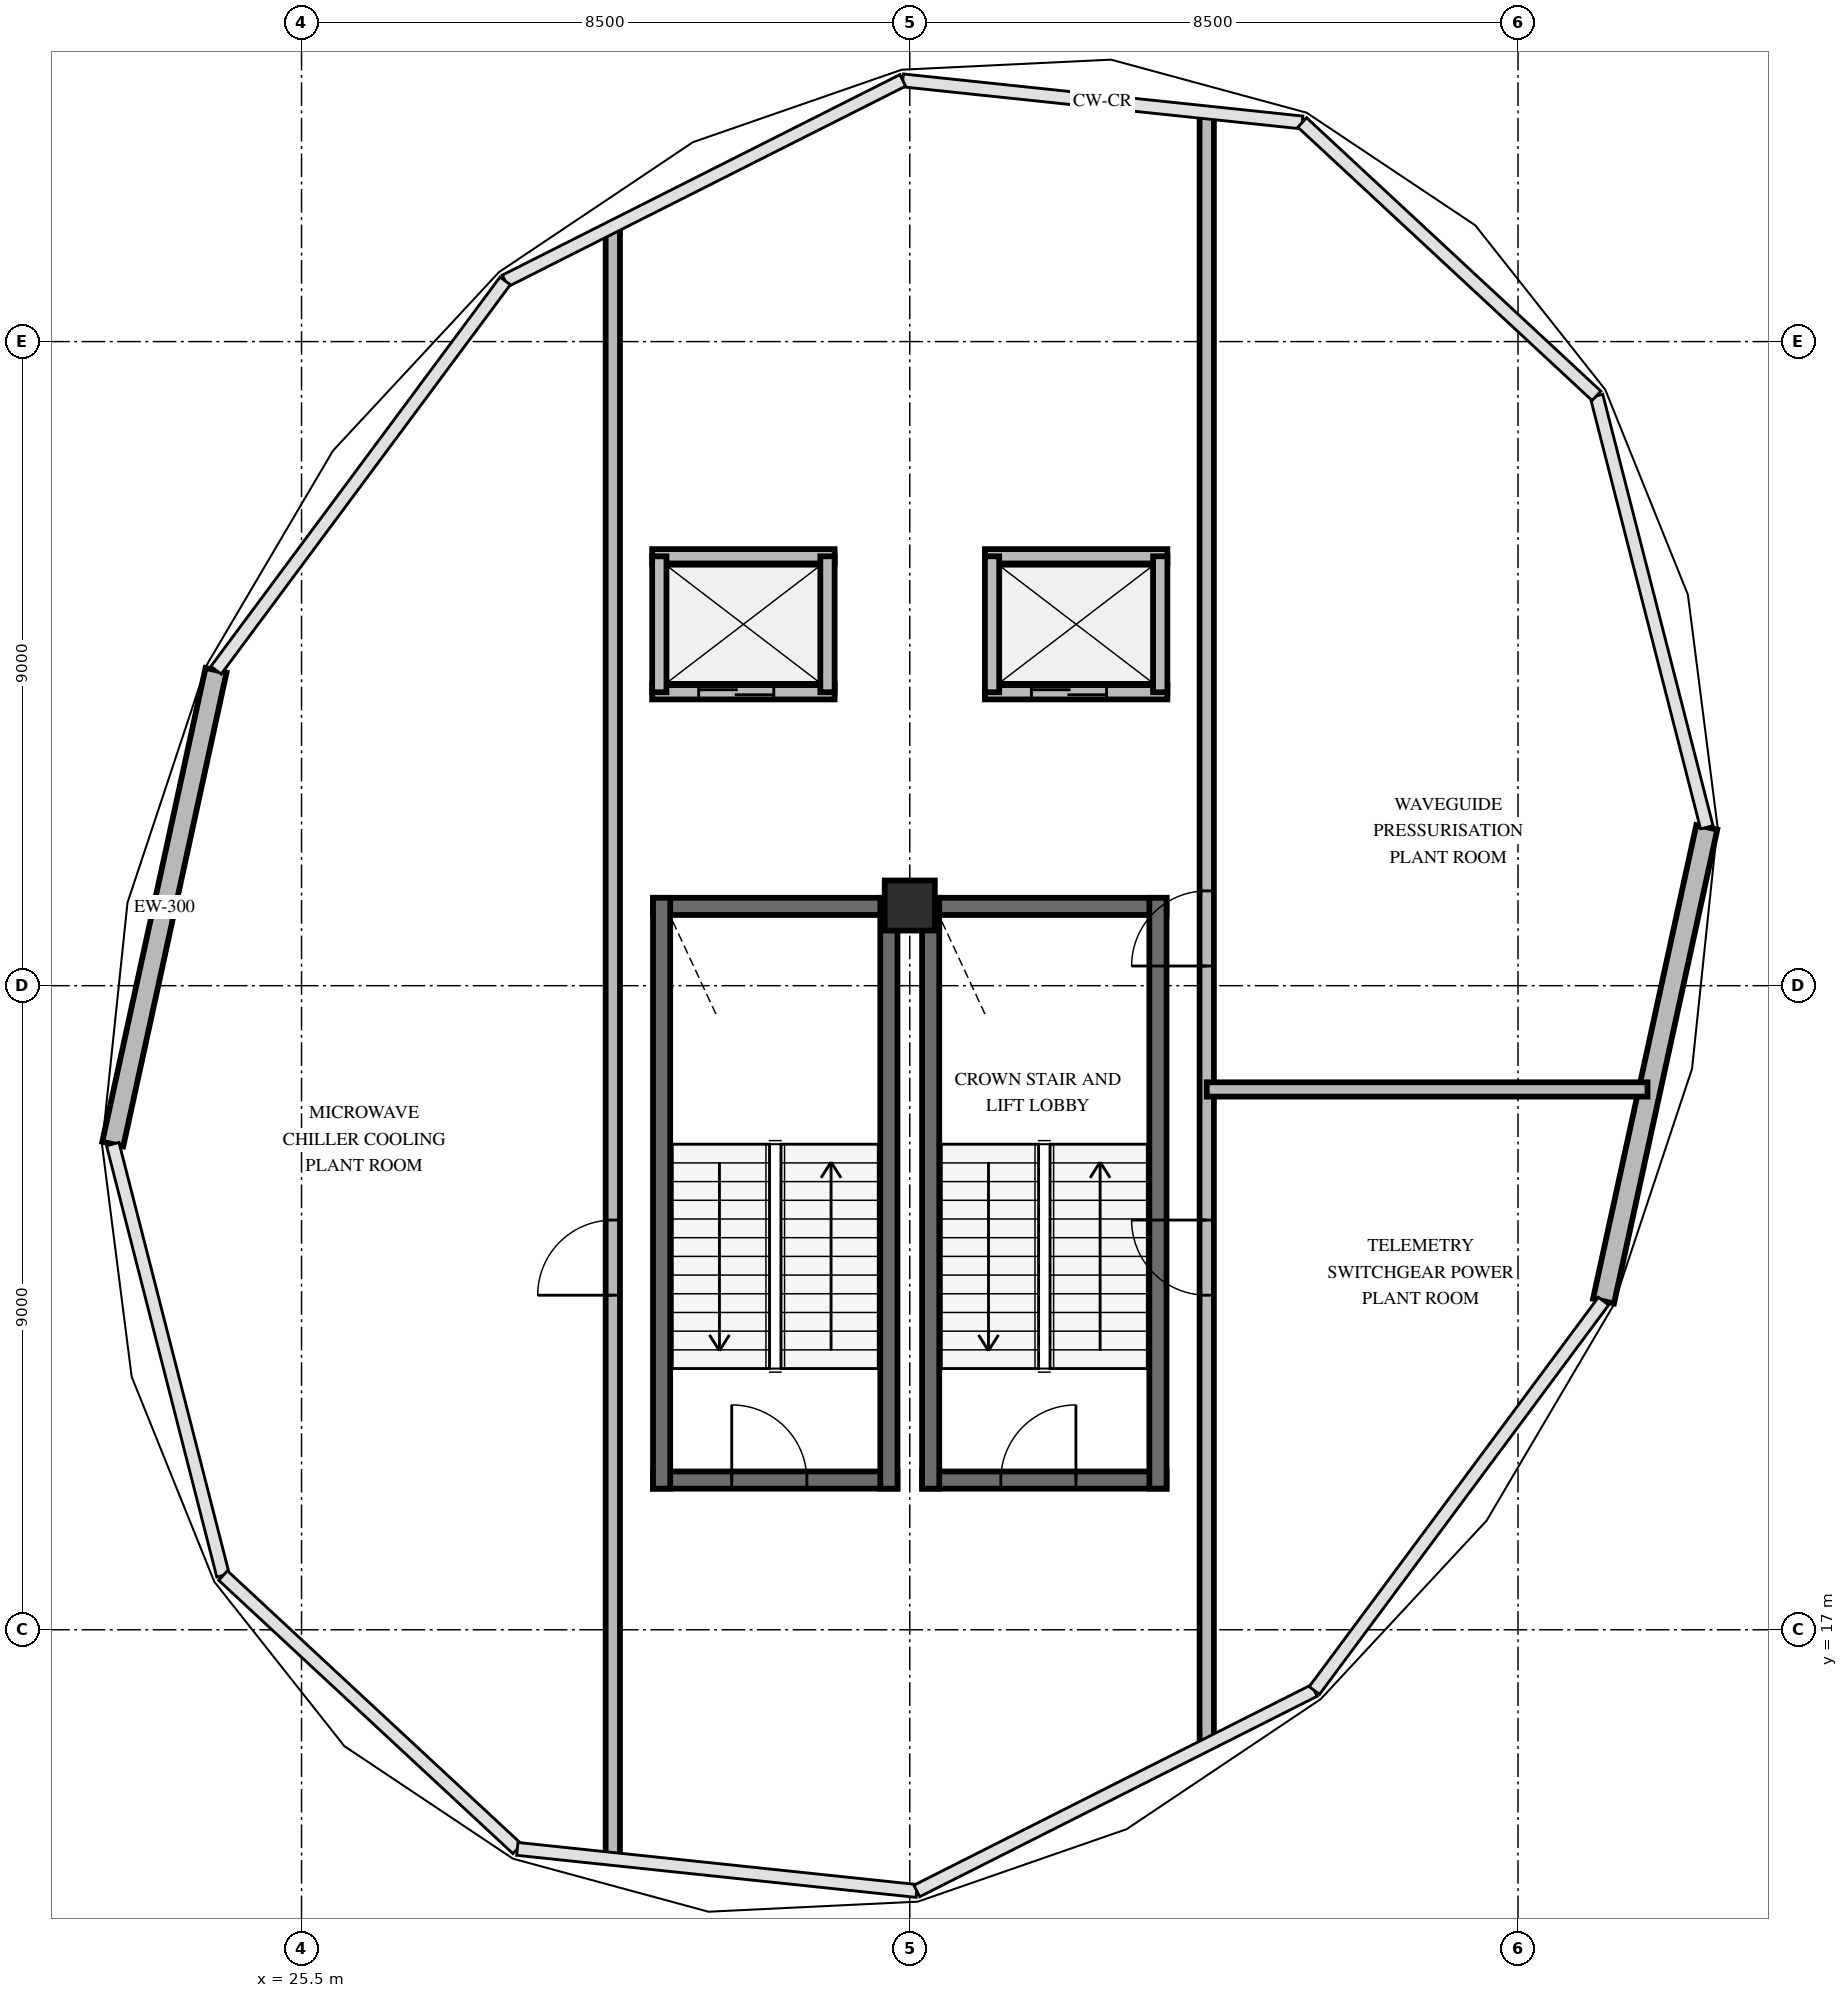
"""IFC4 building model, lengths in metres.
Left out: names, types, materials, properties, quantities, classifications, styles, units other than length and angle.
Written with IfcOpenShell. Run it as: python <this file> out.ifc"""

import sys

from ifc_helpers import new_model, si_unit, direction, frame, frame_2d, origin, origin_2d, place, context, subcontext, project, spatial, rectangle, extrude, element, fill, save


model = new_model("IFC4")
c1 = context("Model", 3, precision=1e-05, world=origin(), true_north=direction((0.0, 1.0)))
c2 = subcontext(c1, "Body", "Model", "MODEL_VIEW")
j1 = project(units=[si_unit("LENGTHUNIT", "METRE"), si_unit("PLANEANGLEUNIT", "RADIAN")], contexts=[c1])
p1 = place(None, origin())
s1 = spatial("IfcSite", under=j1, at=p1, CompositionType="ELEMENT")
p2 = place(p1, origin())
s2 = spatial("IfcBuilding", under=s1, at=p2, CompositionType="ELEMENT")
p3 = place(p2, frame((0.0, 0.0, 300.0)))
s3 = spatial("IfcBuildingStorey", under=s2, at=p3, CompositionType="ELEMENT", Elevation=300.0)
p4 = place(p3, frame((30.412, 19.092, 0.0), z_axis=(0.0, 0.0, 1.0), x_axis=(1.0, 0.0, 0.0)))
e1 = element("IfcWall", 1, at=p4, inside=s3, PredefinedType="SHEAR", context=c2, shape_type="SweptSolid", body=[
    extrude(rectangle(XDim=3.416, YDim=0.24, at=frame_2d((1.708, 0.0))), origin(), (0.0, 0.0, 1.0), 4.0),
])
p5 = place(p4, frame((1.1, 0.0, 0.0)))
e2 = element("IfcOpeningElement", 2, at=p5, cuts=e1, PredefinedType="OPENING", context=c2, shape_type="SweptSolid", body=[
    extrude(rectangle(XDim=1.05, YDim=2.15, at=frame_2d((0.525, 1.075))), frame((0.0, 0.13, 0.0), z_axis=(0.0, -1.0, 0.0), x_axis=(1.0, 0.0, 0.0)), (0.0, 0.0, 1.0), 0.26),
])
p6 = place(p3, frame((30.412, 27.108, 0.0), z_axis=(0.0, 0.0, 1.0), x_axis=(1.0, 0.0, 0.0)))
e3 = element("IfcWall", 3, at=p6, inside=s3, PredefinedType="SHEAR", context=c2, shape_type="SweptSolid", body=[
    extrude(rectangle(XDim=3.416, YDim=0.24, at=frame_2d((1.708, 0.0))), origin(), (0.0, 0.0, 1.0), 4.0),
])
for number, where, z_axis, x_axis in (
    (4, (30.532, 18.972, 0.0), (0.0, 0.0, 1.0), (0.0, 1.0, 0.0)),
    (5, (33.708, 18.972, 0.0), (0.0, 0.0, 1.0), (0.0, 1.0, 0.0)),
):
    element("IfcWall", number, at=place(p3, frame(where, z_axis=z_axis, x_axis=x_axis)), inside=s3, PredefinedType="SHEAR", context=c2, shape_type="SweptSolid", body=[
        extrude(rectangle(XDim=8.256, YDim=0.24, at=frame_2d((4.128, 0.0))), origin(), (0.0, 0.0, 1.0), 4.0),
    ])
p7 = place(p3, frame((34.172, 19.092, 0.0), z_axis=(0.0, 0.0, 1.0), x_axis=(1.0, 0.0, 0.0)))
e6 = element("IfcWall", 6, at=p7, inside=s3, PredefinedType="SHEAR", context=c2, shape_type="SweptSolid", body=[
    extrude(rectangle(XDim=3.416, YDim=0.24, at=frame_2d((1.708, 0.0))), origin(), (0.0, 0.0, 1.0), 4.0),
])
p8 = place(p7, frame((1.1, 0.0, 0.0)))
e7 = element("IfcOpeningElement", 7, at=p8, cuts=e6, PredefinedType="OPENING", context=c2, shape_type="SweptSolid", body=[
    extrude(rectangle(XDim=1.05, YDim=2.15, at=frame_2d((0.525, 1.075))), frame((0.0, 0.13, 0.0), z_axis=(0.0, -1.0, 0.0), x_axis=(1.0, 0.0, 0.0)), (0.0, 0.0, 1.0), 0.26),
])
p9 = place(p3, frame((34.172, 27.108, 0.0), z_axis=(0.0, 0.0, 1.0), x_axis=(1.0, 0.0, 0.0)))
e8 = element("IfcWall", 8, at=p9, inside=s3, PredefinedType="SHEAR", context=c2, shape_type="SweptSolid", body=[
    extrude(rectangle(XDim=3.416, YDim=0.24, at=frame_2d((1.708, 0.0))), origin(), (0.0, 0.0, 1.0), 4.0),
])
for number, where, z_axis, x_axis in (
    (9, (34.292, 18.972, 0.0), (0.0, 0.0, 1.0), (0.0, 1.0, 0.0)),
    (10, (37.468, 18.972, 0.0), (0.0, 0.0, 1.0), (0.0, 1.0, 0.0)),
):
    element("IfcWall", number, at=place(p3, frame(where, z_axis=z_axis, x_axis=x_axis)), inside=s3, PredefinedType="SHEAR", context=c2, shape_type="SweptSolid", body=[
        extrude(rectangle(XDim=8.256, YDim=0.24, at=frame_2d((4.128, 0.0))), origin(), (0.0, 0.0, 1.0), 4.0),
    ])
p10 = place(p3, frame((34.0, 27.12, 0.0), z_axis=(0.0, 0.0, 1.0), x_axis=(1.0, 0.0, 0.0)))
e11 = element("IfcColumn", 11, at=p10, inside=s3, PredefinedType="COLUMN", context=c2, shape_type="SweptSolid", body=[
    extrude(rectangle(XDim=0.7, YDim=0.7, at=origin_2d()), origin(), (0.0, 0.0, 1.0), 4.0),
])
for number, where, z_axis, x_axis in (
    (12, (24.305, 30.408, 0.0), (0.0, 0.0, 1.0), (-0.213, -0.977, 0.0)),
    (13, (43.695, 21.592, 0.0), (0.0, 0.0, 1.0), (0.213, 0.977, 0.0)),
):
    element("IfcWall", number, at=place(p3, frame(where, z_axis=z_axis, x_axis=x_axis)), inside=s3, PredefinedType="SOLIDWALL", context=c2, shape_type="SweptSolid", body=[
        extrude(rectangle(XDim=6.777, YDim=0.3, at=frame_2d((3.388, 0.0))), origin(), (0.0, 0.0, 1.0), 3.39),
    ])
p11 = place(p3, frame((30.4, 30.1, 0.0), z_axis=(0.0, 0.0, 1.0), x_axis=(1.0, 0.0, 0.0)))
e14 = element("IfcWall", 14, at=p11, inside=s3, PredefinedType="SOLIDWALL", context=c2, shape_type="SweptSolid", body=[
    extrude(rectangle(XDim=2.55, YDim=0.2, at=frame_2d((1.275, 0.0))), origin(), (0.0, 0.0, 1.0), 3.33),
])
p12 = place(p11, frame((0.65, 0.0, 0.0)))
e15 = element("IfcOpeningElement", 15, at=p12, cuts=e14, PredefinedType="OPENING", context=c2, shape_type="SweptSolid", body=[
    extrude(rectangle(XDim=1.05, YDim=2.1, at=frame_2d((0.525, 1.05))), frame((0.0, 0.11, 0.0), z_axis=(0.0, -1.0, 0.0), x_axis=(1.0, 0.0, 0.0)), (0.0, 0.0, 1.0), 0.22),
])
p13 = place(p3, frame((30.4, 32.0, 0.0), z_axis=(0.0, 0.0, 1.0), x_axis=(1.0, 0.0, 0.0)))
e16 = element("IfcWall", 16, at=p13, inside=s3, PredefinedType="SOLIDWALL", context=c2, shape_type="SweptSolid", body=[
    extrude(rectangle(XDim=2.55, YDim=0.2, at=frame_2d((1.275, 0.0))), origin(), (0.0, 0.0, 1.0), 3.33),
])
for number, where, z_axis, x_axis in (
    (17, (30.5, 30.1, 0.0), (0.0, 0.0, 1.0), (0.0, 1.0, 0.0)),
    (18, (32.85, 30.1, 0.0), (0.0, 0.0, 1.0), (0.0, 1.0, 0.0)),
):
    element("IfcWall", number, at=place(p3, frame(where, z_axis=z_axis, x_axis=x_axis)), inside=s3, PredefinedType="SOLIDWALL", context=c2, shape_type="SweptSolid", body=[
        extrude(rectangle(XDim=1.9, YDim=0.2, at=frame_2d((0.95, 0.0))), origin(), (0.0, 0.0, 1.0), 3.33),
    ])
p14 = place(p3, frame((35.05, 30.1, 0.0), z_axis=(0.0, 0.0, 1.0), x_axis=(1.0, 0.0, 0.0)))
e19 = element("IfcWall", 19, at=p14, inside=s3, PredefinedType="SOLIDWALL", context=c2, shape_type="SweptSolid", body=[
    extrude(rectangle(XDim=2.55, YDim=0.2, at=frame_2d((1.275, 0.0))), origin(), (0.0, 0.0, 1.0), 3.33),
])
p15 = place(p14, frame((0.65, 0.0, 0.0)))
e20 = element("IfcOpeningElement", 20, at=p15, cuts=e19, PredefinedType="OPENING", context=c2, shape_type="SweptSolid", body=[
    extrude(rectangle(XDim=1.05, YDim=2.1, at=frame_2d((0.525, 1.05))), frame((0.0, 0.11, 0.0), z_axis=(0.0, -1.0, 0.0), x_axis=(1.0, 0.0, 0.0)), (0.0, 0.0, 1.0), 0.22),
])
p16 = place(p3, frame((35.05, 32.0, 0.0), z_axis=(0.0, 0.0, 1.0), x_axis=(1.0, 0.0, 0.0)))
e21 = element("IfcWall", 21, at=p16, inside=s3, PredefinedType="SOLIDWALL", context=c2, shape_type="SweptSolid", body=[
    extrude(rectangle(XDim=2.55, YDim=0.2, at=frame_2d((1.275, 0.0))), origin(), (0.0, 0.0, 1.0), 3.33),
])
for number, where, z_axis, x_axis in (
    (22, (35.15, 30.1, 0.0), (0.0, 0.0, 1.0), (0.0, 1.0, 0.0)),
    (23, (37.5, 30.1, 0.0), (0.0, 0.0, 1.0), (0.0, 1.0, 0.0)),
):
    element("IfcWall", number, at=place(p3, frame(where, z_axis=z_axis, x_axis=x_axis)), inside=s3, PredefinedType="SOLIDWALL", context=c2, shape_type="SweptSolid", body=[
        extrude(rectangle(XDim=1.9, YDim=0.2, at=frame_2d((0.95, 0.0))), origin(), (0.0, 0.0, 1.0), 3.33),
    ])
p17 = place(p3, frame((29.85, 13.826, 0.0), z_axis=(0.0, 0.0, 1.0), x_axis=(0.0, 1.0, 0.0)))
e24 = element("IfcWall", 24, at=p17, inside=s3, PredefinedType="SOLIDWALL", context=c2, shape_type="SweptSolid", body=[
    extrude(rectangle(XDim=22.748, YDim=0.2, at=frame_2d((11.374, 0.0))), origin(), (0.0, 0.0, 1.0), 3.33),
])
p18 = place(p17, frame((7.848, 0.0, 0.0)))
e25 = element("IfcOpeningElement", 25, at=p18, cuts=e24, PredefinedType="OPENING", context=c2, shape_type="SweptSolid", body=[
    extrude(rectangle(XDim=1.05, YDim=2.15, at=frame_2d((0.525, 1.075))), frame((0.0, 0.11, 0.0), z_axis=(0.0, -1.0, 0.0), x_axis=(1.0, 0.0, 0.0)), (0.0, 0.0, 1.0), 0.22),
])
p19 = place(p3, frame((38.15, 15.426, 0.0), z_axis=(0.0, 0.0, 1.0), x_axis=(0.0, 1.0, 0.0)))
e26 = element("IfcWall", 26, at=p19, inside=s3, PredefinedType="SOLIDWALL", context=c2, shape_type="SweptSolid", body=[
    extrude(rectangle(XDim=22.748, YDim=0.2, at=frame_2d((11.374, 0.0))), origin(), (0.0, 0.0, 1.0), 3.33),
])
p20 = place(p19, frame((6.249, 0.0, 0.0)))
e27 = element("IfcOpeningElement", 27, at=p20, cuts=e26, PredefinedType="OPENING", context=c2, shape_type="SweptSolid", body=[
    extrude(rectangle(XDim=1.05, YDim=2.15, at=frame_2d((0.525, 1.075))), frame((0.0, 0.11, 0.0), z_axis=(0.0, -1.0, 0.0), x_axis=(1.0, 0.0, 0.0)), (0.0, 0.0, 1.0), 0.22),
])
p21 = place(p19, frame((10.849, 0.0, 0.0)))
e28 = element("IfcOpeningElement", 28, at=p21, cuts=e26, PredefinedType="OPENING", context=c2, shape_type="SweptSolid", body=[
    extrude(rectangle(XDim=1.05, YDim=2.15, at=frame_2d((0.525, 1.075))), frame((0.0, 0.11, 0.0), z_axis=(0.0, -1.0, 0.0), x_axis=(1.0, 0.0, 0.0)), (0.0, 0.0, 1.0), 0.22),
])
p22 = place(p3, frame((38.15, 24.55, 0.0), z_axis=(0.0, 0.0, 1.0), x_axis=(1.0, 0.0, 0.0)))
e29 = element("IfcWall", 29, at=p22, inside=s3, PredefinedType="SOLIDWALL", context=c2, shape_type="SweptSolid", body=[
    extrude(rectangle(XDim=6.16, YDim=0.2, at=frame_2d((3.08, 0.0))), origin(), (0.0, 0.0, 1.0), 3.33),
])
p23 = place(p5, origin())
e30 = element("IfcDoor", 30, at=p23, inside=s3, OperationType="SINGLE_SWING_LEFT", PredefinedType="DOOR", context=c2, shape_type="SweptSolid", body=[
    extrude(rectangle(XDim=1.05, YDim=2.15, at=frame_2d((0.525, 1.075))), frame((0.0, 0.025, 0.0), z_axis=(0.0, -1.0, 0.0), x_axis=(1.0, 0.0, 0.0)), (0.0, 0.0, 1.0), 0.05),
])
fill(e2, e30)
p24 = place(p8, origin())
e31 = element("IfcDoor", 31, at=p24, inside=s3, OperationType="SINGLE_SWING_RIGHT", PredefinedType="DOOR", context=c2, shape_type="SweptSolid", body=[
    extrude(rectangle(XDim=1.05, YDim=2.15, at=frame_2d((0.525, 1.075))), frame((0.0, 0.025, 0.0), z_axis=(0.0, -1.0, 0.0), x_axis=(1.0, 0.0, 0.0)), (0.0, 0.0, 1.0), 0.05),
])
fill(e7, e31)
p25 = place(p12, origin())
e32 = element("IfcDoor", 32, at=p25, inside=s3, OperationType="DOUBLE_DOOR_SLIDING", PredefinedType="USERDEFINED", context=c2, shape_type="SweptSolid", body=[
    extrude(rectangle(XDim=1.05, YDim=2.1, at=frame_2d((0.525, 1.05))), frame((0.0, 0.025, 0.0), z_axis=(0.0, -1.0, 0.0), x_axis=(1.0, 0.0, 0.0)), (0.0, 0.0, 1.0), 0.05),
])
fill(e15, e32)
p26 = place(p15, origin())
e33 = element("IfcDoor", 33, at=p26, inside=s3, OperationType="DOUBLE_DOOR_SLIDING", PredefinedType="USERDEFINED", context=c2, shape_type="SweptSolid", body=[
    extrude(rectangle(XDim=1.05, YDim=2.1, at=frame_2d((0.525, 1.05))), frame((0.0, 0.025, 0.0), z_axis=(0.0, -1.0, 0.0), x_axis=(1.0, 0.0, 0.0)), (0.0, 0.0, 1.0), 0.05),
])
fill(e20, e33)
p27 = place(p18, origin())
e34 = element("IfcDoor", 34, at=p27, inside=s3, OperationType="SINGLE_SWING_LEFT", PredefinedType="DOOR", context=c2, shape_type="SweptSolid", body=[
    extrude(rectangle(XDim=1.05, YDim=2.15, at=frame_2d((0.525, 1.075))), frame((0.0, 0.025, 0.0), z_axis=(0.0, -1.0, 0.0), x_axis=(1.0, 0.0, 0.0)), (0.0, 0.0, 1.0), 0.05),
])
fill(e25, e34)
p28 = place(p20, origin())
e35 = element("IfcDoor", 35, at=p28, inside=s3, OperationType="SINGLE_SWING_RIGHT", PredefinedType="DOOR", context=c2, shape_type="SweptSolid", body=[
    extrude(rectangle(XDim=1.05, YDim=2.15, at=frame_2d((0.525, 1.075))), frame((0.0, 0.025, 0.0), z_axis=(0.0, -1.0, 0.0), x_axis=(1.0, 0.0, 0.0)), (0.0, 0.0, 1.0), 0.05),
])
fill(e27, e35)
p29 = place(p21, origin())
e36 = element("IfcDoor", 36, at=p29, inside=s3, OperationType="SINGLE_SWING_LEFT", PredefinedType="DOOR", context=c2, shape_type="SweptSolid", body=[
    extrude(rectangle(XDim=1.05, YDim=2.15, at=frame_2d((0.525, 1.075))), frame((0.0, 0.025, 0.0), z_axis=(0.0, -1.0, 0.0), x_axis=(1.0, 0.0, 0.0)), (0.0, 0.0, 1.0), 0.05),
])
fill(e28, e36)
save(model, sys.argv[1])
